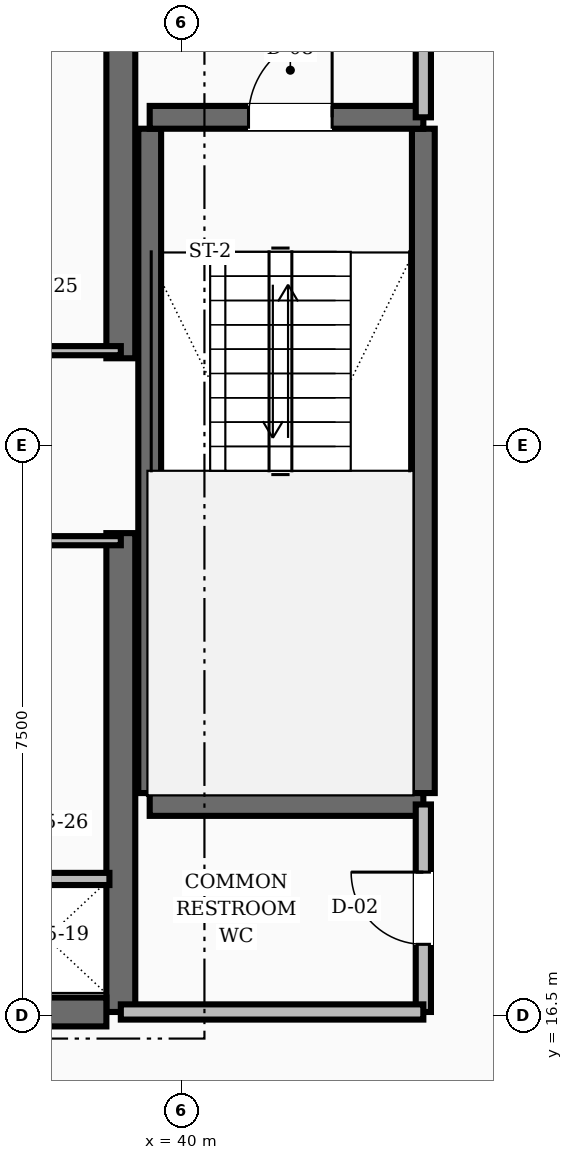
"""IFC4 building model, lengths in metres.
Left out: names, types, materials, properties, quantities, classifications, styles, units other than length and angle.
Written with IfcOpenShell. Run it as: python <this file> out.ifc"""

import sys

from ifc_helpers import new_model, si_unit, direction, frame, frame_2d, origin, place, context, subcontext, project, spatial, rectangle, extrude, element, fill, save


model = new_model("IFC4")
c1 = context("Model", 3, precision=1e-05, world=origin(), true_north=direction((0.0, 1.0)))
c2 = subcontext(c1, "Body", "Model", "MODEL_VIEW")
j1 = project(units=[si_unit("LENGTHUNIT", "METRE"), si_unit("PLANEANGLEUNIT", "RADIAN")], contexts=[c1])
p1 = place(None, origin())
s1 = spatial("IfcSite", under=j1, at=p1, CompositionType="ELEMENT")
p2 = place(p1, origin())
s2 = spatial("IfcBuilding", under=s1, at=p2, CompositionType="ELEMENT")
p3 = place(p2, frame((0.0, 0.0, 62.8)))
s3 = spatial("IfcBuildingStorey", under=s2, at=p3, CompositionType="ELEMENT", Elevation=62.8)
for number, where, z_axis, x_axis in (
    (1, (39.2, 16.55, 0.0), (0.0, 0.0, 1.0), (0.0, 1.0, 0.0)),
    (2, (39.2, 25.15, 0.0), (0.0, 0.0, 1.0), (0.0, 1.0, 0.0)),
):
    element("IfcWall", number, at=place(p3, frame(where, z_axis=z_axis, x_axis=x_axis)), inside=s3, PredefinedType="SHEAR", context=c2, shape_type="SweptSolid", body=[
        extrude(rectangle(XDim=6.3, YDim=0.38, at=frame_2d((3.15, 0.0))), origin(), (0.0, 0.0, 1.0), 3.6),
    ])
p4 = place(p3, frame((35.8, 16.55, 0.0), z_axis=(0.0, 0.0, 1.0), x_axis=(1.0, 0.0, 0.0)))
e3 = element("IfcWall", 3, at=p4, inside=s3, PredefinedType="SHEAR", context=c2, shape_type="SweptSolid", body=[
    extrude(rectangle(XDim=3.21, YDim=0.38, at=frame_2d((1.605, 0.0))), origin(), (0.0, 0.0, 1.0), 3.6),
])
p5 = place(p4, frame((0.3, 0.0, 0.0)))
e4 = element("IfcOpeningElement", 4, at=p5, cuts=e3, PredefinedType="OPENING", context=c2, shape_type="SweptSolid", body=[
    extrude(rectangle(XDim=1.1, YDim=2.1, at=frame_2d((0.55, 1.05))), frame((0.0, 0.2, 0.0), z_axis=(0.0, -1.0, 0.0), x_axis=(1.0, 0.0, 0.0)), (0.0, 0.0, 1.0), 0.4),
])
for number, where, z_axis, x_axis in (
    (5, (43.18, 19.43, 0.0), (0.0, 0.0, 1.0), (0.0, 1.0, 0.0)),
    (6, (39.58, 19.43, 0.0), (0.0, 0.0, 1.0), (0.0, 1.0, 0.0)),
):
    element("IfcWall", number, at=place(p3, frame(where, z_axis=z_axis, x_axis=x_axis)), inside=s3, PredefinedType="SHEAR", context=c2, shape_type="SweptSolid", body=[
        extrude(rectangle(XDim=8.74, YDim=0.3, at=frame_2d((4.37, 0.0))), origin(), (0.0, 0.0, 1.0), 3.6),
    ])
p6 = place(p3, frame((39.58, 19.28, 0.0), z_axis=(0.0, 0.0, 1.0), x_axis=(1.0, 0.0, 0.0)))
e7 = element("IfcWall", 7, at=p6, inside=s3, PredefinedType="SHEAR", context=c2, shape_type="SweptSolid", body=[
    extrude(rectangle(XDim=3.6, YDim=0.3, at=frame_2d((1.8, 0.0))), origin(), (0.0, 0.0, 1.0), 3.6),
])
p7 = place(p3, frame((39.58, 28.32, 0.0), z_axis=(0.0, 0.0, 1.0), x_axis=(1.0, 0.0, 0.0)))
e8 = element("IfcWall", 8, at=p7, inside=s3, PredefinedType="SHEAR", context=c2, shape_type="SweptSolid", body=[
    extrude(rectangle(XDim=3.6, YDim=0.3, at=frame_2d((1.8, 0.0))), origin(), (0.0, 0.0, 1.0), 3.6),
])
p8 = place(p7, frame((1.3, 0.0, 0.0)))
e9 = element("IfcOpeningElement", 9, at=p8, cuts=e8, PredefinedType="OPENING", context=c2, shape_type="SweptSolid", body=[
    extrude(rectangle(XDim=1.1, YDim=2.1, at=frame_2d((0.55, 1.05))), frame((0.0, 0.16, 0.0), z_axis=(0.0, -1.0, 0.0), x_axis=(1.0, 0.0, 0.0)), (0.0, 0.0, 1.0), 0.32),
])
p9 = place(p3, frame((43.18, 28.32, 0.0), z_axis=(0.0, 0.0, 1.0), x_axis=(0.0, 1.0, 0.0)))
e10 = element("IfcWall", 10, at=p9, inside=s3, PredefinedType="SOLIDWALL", context=c2, shape_type="SweptSolid", body=[
    extrude(rectangle(XDim=3.13, YDim=0.2, at=frame_2d((1.565, 0.0))), origin(), (0.0, 0.0, 1.0), 2.71),
])
p10 = place(p9, frame((1.015, 0.0, 0.0)))
e11 = element("IfcOpeningElement", 11, at=p10, cuts=e10, PredefinedType="OPENING", context=c2, shape_type="SweptSolid", body=[
    extrude(rectangle(XDim=1.1, YDim=2.1, at=frame_2d((0.55, 1.05))), frame((0.0, 0.11, 0.0), z_axis=(0.0, -1.0, 0.0), x_axis=(1.0, 0.0, 0.0)), (0.0, 0.0, 1.0), 0.22),
])
p11 = place(p3, frame((43.18, 16.55, 0.0), z_axis=(0.0, 0.0, 1.0), x_axis=(0.0, 1.0, 0.0)))
e12 = element("IfcWall", 12, at=p11, inside=s3, PredefinedType="SOLIDWALL", context=c2, shape_type="SweptSolid", body=[
    extrude(rectangle(XDim=2.73, YDim=0.2, at=frame_2d((1.365, 0.0))), origin(), (0.0, 0.0, 1.0), 2.71),
])
p12 = place(p11, frame((0.89, 0.0, 0.0)))
e13 = element("IfcOpeningElement", 13, at=p12, cuts=e12, PredefinedType="OPENING", context=c2, shape_type="SweptSolid", body=[
    extrude(rectangle(XDim=0.95, YDim=2.1, at=frame_2d((0.475, 1.05))), frame((0.0, 0.11, 0.0), z_axis=(0.0, -1.0, 0.0), x_axis=(1.0, 0.0, 0.0)), (0.0, 0.0, 1.0), 0.22),
])
p13 = place(p3, frame((39.2, 16.55, 0.0), z_axis=(0.0, 0.0, 1.0), x_axis=(1.0, 0.0, 0.0)))
e14 = element("IfcWall", 14, at=p13, inside=s3, PredefinedType="SOLIDWALL", context=c2, shape_type="SweptSolid", body=[
    extrude(rectangle(XDim=3.98, YDim=0.2, at=frame_2d((1.99, 0.0))), origin(), (0.0, 0.0, 1.0), 2.71),
])
p14 = place(p3, frame((37.4, 18.3, 0.0), z_axis=(0.0, 0.0, 1.0), x_axis=(1.0, 0.0, 0.0)))
e15 = element("IfcWall", 15, at=p14, inside=s3, PredefinedType="SOLIDWALL", context=c2, shape_type="SweptSolid", body=[
    extrude(rectangle(XDim=1.65, YDim=0.16, at=frame_2d((0.825, 0.0))), origin(), (0.0, 0.0, 1.0), 2.71),
])
for number, where, z_axis, x_axis in (
    (16, (37.4, 25.25, 0.0), (0.0, 0.0, 1.0), (1.0, 0.0, 0.0)),
    (17, (37.4, 22.75, 0.0), (0.0, 0.0, 1.0), (1.0, 0.0, 0.0)),
):
    element("IfcWall", number, at=place(p3, frame(where, z_axis=z_axis, x_axis=x_axis)), inside=s3, PredefinedType="PARTITIONING", context=c2, shape_type="SweptSolid", body=[
        extrude(rectangle(XDim=1.8, YDim=0.12, at=frame_2d((0.9, 0.0))), origin(), (0.0, 0.0, 1.0), 2.71),
    ])
p15 = place(p3, frame((43.349, 14.56, 0.0), z_axis=(0.0, 0.0, 1.0), x_axis=(0.702366174226, 0.711815816981, 0.0)))
e18 = element("IfcWall", 18, at=p15, inside=s3, PredefinedType="SOLIDWALL", context=c2, shape_type="SweptSolid", body=[
    extrude(rectangle(XDim=2.842, YDim=0.16, at=frame_2d((1.421, 0.0))), origin(), (0.0, 0.0, 1.0), 2.71),
])
p16 = place(p8, origin())
e19 = element("IfcDoor", 19, at=p16, inside=s3, OperationType="SINGLE_SWING_RIGHT", PredefinedType="DOOR", context=c2, shape_type="SweptSolid", body=[
    extrude(rectangle(XDim=1.1, YDim=2.1, at=frame_2d((0.55, 1.05))), frame((0.0, 0.025, 0.0), z_axis=(0.0, -1.0, 0.0), x_axis=(1.0, 0.0, 0.0)), (0.0, 0.0, 1.0), 0.05),
])
fill(e9, e19)
p17 = place(p12, origin())
e20 = element("IfcDoor", 20, at=p17, inside=s3, OperationType="SINGLE_SWING_RIGHT", PredefinedType="DOOR", context=c2, shape_type="SweptSolid", body=[
    extrude(rectangle(XDim=0.95, YDim=2.1, at=frame_2d((0.475, 1.05))), frame((0.0, 0.025, 0.0), z_axis=(0.0, -1.0, 0.0), x_axis=(1.0, 0.0, 0.0)), (0.0, 0.0, 1.0), 0.05),
])
fill(e13, e20)
save(model, sys.argv[1])
